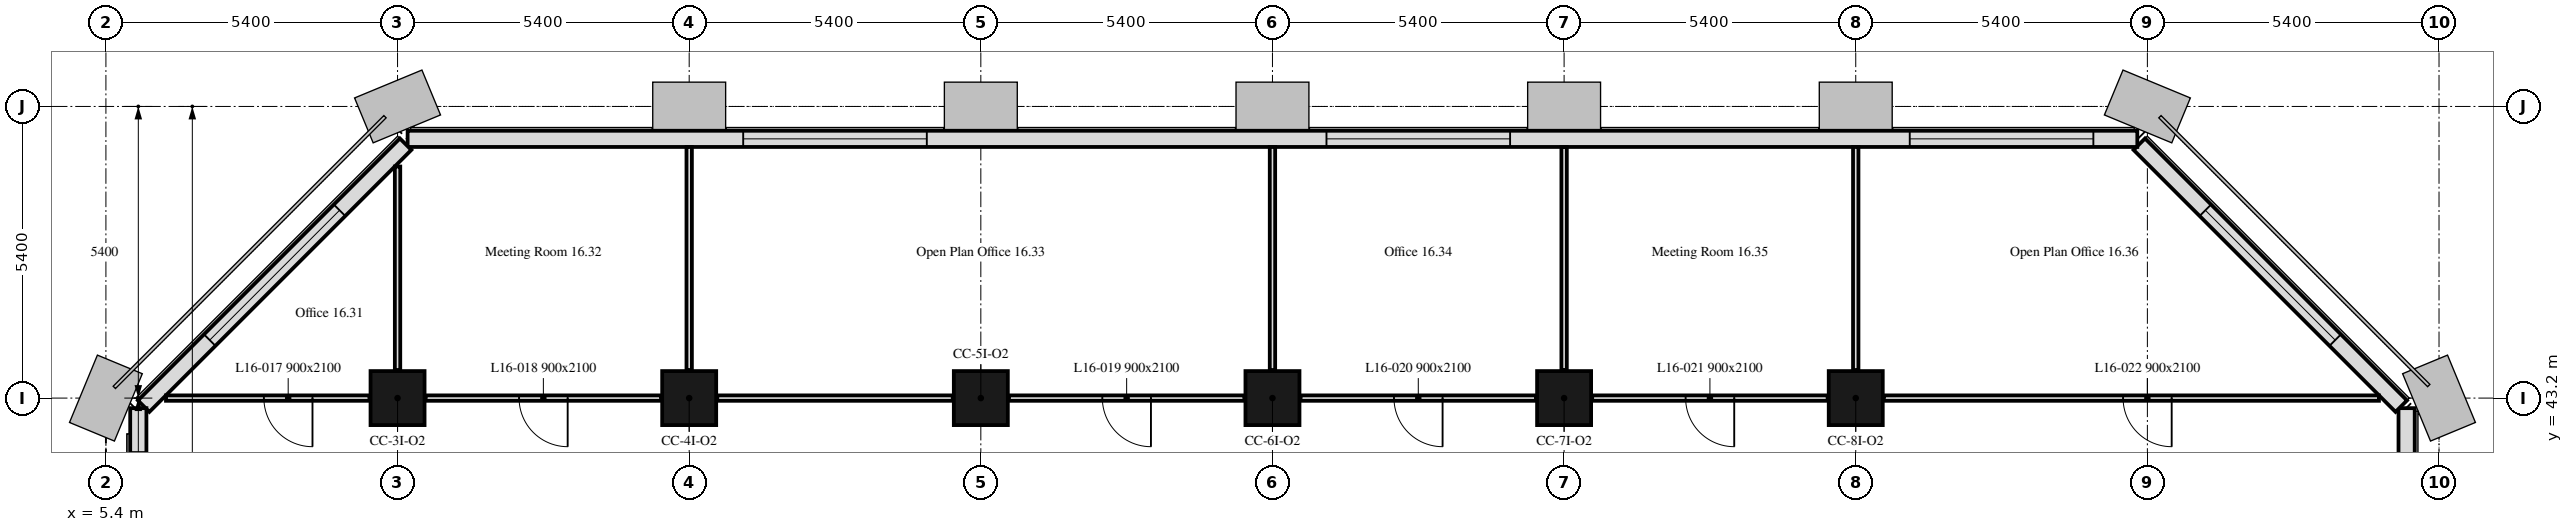
"""IFC4 building model, lengths in metres.
Left out: names, types, materials, properties, quantities, classifications, styles, units other than length and angle.
Written with IfcOpenShell. Run it as: python <this file> out.ifc"""

import sys

from ifc_helpers import new_model, si_unit, direction, frame, frame_2d, origin, origin_2d, place, context, subcontext, project, spatial, rectangle, extrude, element, fill, save


model = new_model("IFC4")
c1 = context("Model", 3, precision=1e-05, world=origin(), true_north=direction((0.0, 1.0)))
c2 = subcontext(c1, "Body", "Model", "MODEL_VIEW")
j1 = project(units=[si_unit("LENGTHUNIT", "METRE"), si_unit("PLANEANGLEUNIT", "RADIAN")], contexts=[c1])
p1 = place(None, origin())
s1 = spatial("IfcSite", under=j1, at=p1, CompositionType="ELEMENT")
p2 = place(p1, origin())
s2 = spatial("IfcBuilding", under=s1, at=p2, CompositionType="ELEMENT")
p3 = place(p2, frame((0.0, 0.0, 72.6)))
s3 = spatial("IfcBuildingStorey", under=s2, at=p3, CompositionType="ELEMENT", Elevation=72.6)
for number, where, z_axis, x_axis in (
    (1, (10.8, 43.2, 0.0), (0.0, 0.0, 1.0), (1.0, 0.0, 0.0)),
    (2, (16.2, 43.2, 0.0), (0.0, 0.0, 1.0), (1.0, 0.0, 0.0)),
    (3, (21.6, 43.2, 0.0), (0.0, 0.0, 1.0), (1.0, 0.0, 0.0)),
    (4, (27.0, 43.2, 0.0), (0.0, 0.0, 1.0), (1.0, 0.0, 0.0)),
    (5, (32.4, 43.2, 0.0), (0.0, 0.0, 1.0), (1.0, 0.0, 0.0)),
    (6, (37.8, 43.2, 0.0), (0.0, 0.0, 1.0), (1.0, 0.0, 0.0)),
):
    element("IfcColumn", number, at=place(p3, frame(where, z_axis=z_axis, x_axis=x_axis)), inside=s3, PredefinedType="COLUMN", context=c2, shape_type="SweptSolid", body=[
        extrude(rectangle(XDim=1.0, YDim=1.0, at=origin_2d()), origin(), (0.0, 0.0, 1.0), 3.5),
    ])
p4 = place(p3, frame((48.0, 10.986, 0.0), z_axis=(0.0, 0.0, 1.0), x_axis=(0.0, 1.0, 0.0)))
e7 = element("IfcWall", 7, at=p4, inside=s3, PredefinedType="SOLIDWALL", context=c2, shape_type="SweptSolid", body=[
    extrude(rectangle(XDim=32.027, YDim=0.3, at=frame_2d((16.014, 0.0))), origin(), (0.0, 0.0, 1.0), 3.5),
])
p5 = place(p4, frame((1.164, 0.0, 0.9)))
e8 = element("IfcOpeningElement", 8, at=p5, cuts=e7, PredefinedType="OPENING", context=c2, shape_type="SweptSolid", body=[
    extrude(rectangle(XDim=1.1, YDim=1.7, at=frame_2d((0.55, 0.85))), frame((0.0, 0.16, 0.0), z_axis=(0.0, -1.0, 0.0), x_axis=(1.0, 0.0, 0.0)), (0.0, 0.0, 1.0), 0.32),
])
p6 = place(p4, frame((2.764, 0.0, 0.9)))
e9 = element("IfcOpeningElement", 9, at=p6, cuts=e7, PredefinedType="OPENING", context=c2, shape_type="SweptSolid", body=[
    extrude(rectangle(XDim=1.1, YDim=1.7, at=frame_2d((0.55, 0.85))), frame((0.0, 0.16, 0.0), z_axis=(0.0, -1.0, 0.0), x_axis=(1.0, 0.0, 0.0)), (0.0, 0.0, 1.0), 0.32),
])
p7 = place(p4, frame((11.614, 0.0, 0.9)))
e10 = element("IfcOpeningElement", 10, at=p7, cuts=e7, PredefinedType="OPENING", context=c2, shape_type="SweptSolid", body=[
    extrude(rectangle(XDim=3.4, YDim=1.7, at=frame_2d((1.7, 0.85))), frame((0.0, 0.16, 0.0), z_axis=(0.0, -1.0, 0.0), x_axis=(1.0, 0.0, 0.0)), (0.0, 0.0, 1.0), 0.32),
])
p8 = place(p4, frame((22.764, 0.0, 0.9)))
e11 = element("IfcOpeningElement", 11, at=p8, cuts=e7, PredefinedType="OPENING", context=c2, shape_type="SweptSolid", body=[
    extrude(rectangle(XDim=1.1, YDim=1.7, at=frame_2d((0.55, 0.85))), frame((0.0, 0.16, 0.0), z_axis=(0.0, -1.0, 0.0), x_axis=(1.0, 0.0, 0.0)), (0.0, 0.0, 1.0), 0.32),
])
p9 = place(p4, frame((24.364, 0.0, 0.9)))
e12 = element("IfcOpeningElement", 12, at=p9, cuts=e7, PredefinedType="OPENING", context=c2, shape_type="SweptSolid", body=[
    extrude(rectangle(XDim=1.1, YDim=1.7, at=frame_2d((0.55, 0.85))), frame((0.0, 0.16, 0.0), z_axis=(0.0, -1.0, 0.0), x_axis=(1.0, 0.0, 0.0)), (0.0, 0.0, 1.0), 0.32),
])
p10 = place(p3, frame((47.901, 43.051, 0.0), z_axis=(0.0, 0.0, 1.0), x_axis=(-0.707106781187, 0.707106781187, 0.0)))
e13 = element("IfcWall", 13, at=p10, inside=s3, PredefinedType="SOLIDWALL", context=c2, shape_type="SweptSolid", body=[
    extrude(rectangle(XDim=6.86, YDim=0.3, at=frame_2d((3.43, 0.0))), origin(), (0.0, 0.0, 1.0), 3.5),
])
p11 = place(p10, frame((1.73, 0.0, 0.9)))
e14 = element("IfcOpeningElement", 14, at=p11, cuts=e13, PredefinedType="OPENING", context=c2, shape_type="SweptSolid", body=[
    extrude(rectangle(XDim=3.4, YDim=1.7, at=frame_2d((1.7, 0.85))), frame((0.0, 0.16, 0.0), z_axis=(0.0, -1.0, 0.0), x_axis=(1.0, 0.0, 0.0)), (0.0, 0.0, 1.0), 0.32),
])
p12 = place(p3, frame((43.014, 48.0, 0.0), z_axis=(0.0, 0.0, 1.0), x_axis=(-1.0, 0.0, 0.0)))
e15 = element("IfcWall", 15, at=p12, inside=s3, PredefinedType="SOLIDWALL", context=c2, shape_type="SweptSolid", body=[
    extrude(rectangle(XDim=32.027, YDim=0.3, at=frame_2d((16.014, 0.0))), origin(), (0.0, 0.0, 1.0), 3.5),
])
p13 = place(p12, frame((0.814, 0.0, 0.9)))
e16 = element("IfcOpeningElement", 16, at=p13, cuts=e15, PredefinedType="OPENING", context=c2, shape_type="SweptSolid", body=[
    extrude(rectangle(XDim=3.4, YDim=1.7, at=frame_2d((1.7, 0.85))), frame((0.0, 0.16, 0.0), z_axis=(0.0, -1.0, 0.0), x_axis=(1.0, 0.0, 0.0)), (0.0, 0.0, 1.0), 0.32),
])
p14 = place(p12, frame((11.614, 0.0, 0.9)))
e17 = element("IfcOpeningElement", 17, at=p14, cuts=e15, PredefinedType="OPENING", context=c2, shape_type="SweptSolid", body=[
    extrude(rectangle(XDim=3.4, YDim=1.7, at=frame_2d((1.7, 0.85))), frame((0.0, 0.16, 0.0), z_axis=(0.0, -1.0, 0.0), x_axis=(1.0, 0.0, 0.0)), (0.0, 0.0, 1.0), 0.32),
])
p15 = place(p12, frame((22.414, 0.0, 0.9)))
e18 = element("IfcOpeningElement", 18, at=p15, cuts=e15, PredefinedType="OPENING", context=c2, shape_type="SweptSolid", body=[
    extrude(rectangle(XDim=3.4, YDim=1.7, at=frame_2d((1.7, 0.85))), frame((0.0, 0.16, 0.0), z_axis=(0.0, -1.0, 0.0), x_axis=(1.0, 0.0, 0.0)), (0.0, 0.0, 1.0), 0.32),
])
p16 = place(p3, frame((10.949, 47.901, 0.0), z_axis=(0.0, 0.0, 1.0), x_axis=(-0.707106781187, -0.707106781187, 0.0)))
e19 = element("IfcWall", 19, at=p16, inside=s3, PredefinedType="SOLIDWALL", context=c2, shape_type="SweptSolid", body=[
    extrude(rectangle(XDim=6.86, YDim=0.3, at=frame_2d((3.43, 0.0))), origin(), (0.0, 0.0, 1.0), 3.5),
])
p17 = place(p16, frame((1.73, 0.0, 0.9)))
e20 = element("IfcOpeningElement", 20, at=p17, cuts=e19, PredefinedType="OPENING", context=c2, shape_type="SweptSolid", body=[
    extrude(rectangle(XDim=3.4, YDim=1.7, at=frame_2d((1.7, 0.85))), frame((0.0, 0.16, 0.0), z_axis=(0.0, -1.0, 0.0), x_axis=(1.0, 0.0, 0.0)), (0.0, 0.0, 1.0), 0.32),
])
p18 = place(p3, frame((6.0, 43.014, 0.0), z_axis=(0.0, 0.0, 1.0), x_axis=(0.0, -1.0, 0.0)))
e21 = element("IfcWall", 21, at=p18, inside=s3, PredefinedType="SOLIDWALL", context=c2, shape_type="SweptSolid", body=[
    extrude(rectangle(XDim=10.614, YDim=0.3, at=frame_2d((5.307, 0.0))), origin(), (0.0, 0.0, 1.0), 3.5),
])
p19 = place(p18, frame((0.814, 0.0, 0.9)))
e22 = element("IfcOpeningElement", 22, at=p19, cuts=e21, PredefinedType="OPENING", context=c2, shape_type="SweptSolid", body=[
    extrude(rectangle(XDim=3.4, YDim=1.7, at=frame_2d((1.7, 0.85))), frame((0.0, 0.16, 0.0), z_axis=(0.0, -1.0, 0.0), x_axis=(1.0, 0.0, 0.0)), (0.0, 0.0, 1.0), 0.32),
])
p20 = place(p3, frame((47.488, 43.2, 0.0), z_axis=(0.0, 0.0, 1.0), x_axis=(-1.0, 0.0, 0.0)))
e23 = element("IfcWall", 23, at=p20, inside=s3, PredefinedType="PARTITIONING", context=c2, shape_type="SweptSolid", body=[
    extrude(rectangle(XDim=9.168, YDim=0.1, at=frame_2d((4.584, 0.0))), origin(), (0.0, 0.0, 1.0), 3.5),
])
p21 = place(p20, frame((3.838, 0.0, 0.0)))
e24 = element("IfcOpeningElement", 24, at=p21, cuts=e23, PredefinedType="OPENING", context=c2, shape_type="SweptSolid", body=[
    extrude(rectangle(XDim=0.9, YDim=2.1, at=frame_2d((0.45, 1.05))), frame((0.0, 0.05, 0.0), z_axis=(0.0, -1.0, 0.0), x_axis=(1.0, 0.0, 0.0)), (0.0, 0.0, 1.0), 0.1),
])
p22 = place(p3, frame((37.28, 43.2, 0.0), z_axis=(0.0, 0.0, 1.0), x_axis=(-1.0, 0.0, 0.0)))
e25 = element("IfcWall", 25, at=p22, inside=s3, PredefinedType="PARTITIONING", context=c2, shape_type="SweptSolid", body=[
    extrude(rectangle(XDim=4.36, YDim=0.1, at=frame_2d((2.18, 0.0))), origin(), (0.0, 0.0, 1.0), 3.5),
])
p23 = place(p22, frame((1.73, 0.0, 0.0)))
e26 = element("IfcOpeningElement", 26, at=p23, cuts=e25, PredefinedType="OPENING", context=c2, shape_type="SweptSolid", body=[
    extrude(rectangle(XDim=0.9, YDim=2.1, at=frame_2d((0.45, 1.05))), frame((0.0, 0.05, 0.0), z_axis=(0.0, -1.0, 0.0), x_axis=(1.0, 0.0, 0.0)), (0.0, 0.0, 1.0), 0.1),
])
p24 = place(p3, frame((31.88, 43.2, 0.0), z_axis=(0.0, 0.0, 1.0), x_axis=(-1.0, 0.0, 0.0)))
e27 = element("IfcWall", 27, at=p24, inside=s3, PredefinedType="PARTITIONING", context=c2, shape_type="SweptSolid", body=[
    extrude(rectangle(XDim=4.36, YDim=0.1, at=frame_2d((2.18, 0.0))), origin(), (0.0, 0.0, 1.0), 3.5),
])
p25 = place(p24, frame((1.73, 0.0, 0.0)))
e28 = element("IfcOpeningElement", 28, at=p25, cuts=e27, PredefinedType="OPENING", context=c2, shape_type="SweptSolid", body=[
    extrude(rectangle(XDim=0.9, YDim=2.1, at=frame_2d((0.45, 1.05))), frame((0.0, 0.05, 0.0), z_axis=(0.0, -1.0, 0.0), x_axis=(1.0, 0.0, 0.0)), (0.0, 0.0, 1.0), 0.1),
])
p26 = place(p3, frame((26.48, 43.2, 0.0), z_axis=(0.0, 0.0, 1.0), x_axis=(-1.0, 0.0, 0.0)))
e29 = element("IfcWall", 29, at=p26, inside=s3, PredefinedType="PARTITIONING", context=c2, shape_type="SweptSolid", body=[
    extrude(rectangle(XDim=4.36, YDim=0.1, at=frame_2d((2.18, 0.0))), origin(), (0.0, 0.0, 1.0), 3.5),
])
p27 = place(p26, frame((1.73, 0.0, 0.0)))
e30 = element("IfcOpeningElement", 30, at=p27, cuts=e29, PredefinedType="OPENING", context=c2, shape_type="SweptSolid", body=[
    extrude(rectangle(XDim=0.9, YDim=2.1, at=frame_2d((0.45, 1.05))), frame((0.0, 0.05, 0.0), z_axis=(0.0, -1.0, 0.0), x_axis=(1.0, 0.0, 0.0)), (0.0, 0.0, 1.0), 0.1),
])
p28 = place(p3, frame((21.08, 43.2, 0.0), z_axis=(0.0, 0.0, 1.0), x_axis=(-1.0, 0.0, 0.0)))
e31 = element("IfcWall", 31, at=p28, inside=s3, PredefinedType="PARTITIONING", context=c2, shape_type="SweptSolid", body=[
    extrude(rectangle(XDim=4.36, YDim=0.1, at=frame_2d((2.18, 0.0))), origin(), (0.0, 0.0, 1.0), 3.5),
])
p29 = place(p3, frame((15.68, 43.2, 0.0), z_axis=(0.0, 0.0, 1.0), x_axis=(-1.0, 0.0, 0.0)))
e32 = element("IfcWall", 32, at=p29, inside=s3, PredefinedType="PARTITIONING", context=c2, shape_type="SweptSolid", body=[
    extrude(rectangle(XDim=4.36, YDim=0.1, at=frame_2d((2.18, 0.0))), origin(), (0.0, 0.0, 1.0), 3.5),
])
p30 = place(p29, frame((1.73, 0.0, 0.0)))
e33 = element("IfcOpeningElement", 33, at=p30, cuts=e32, PredefinedType="OPENING", context=c2, shape_type="SweptSolid", body=[
    extrude(rectangle(XDim=0.9, YDim=2.1, at=frame_2d((0.45, 1.05))), frame((0.0, 0.05, 0.0), z_axis=(0.0, -1.0, 0.0), x_axis=(1.0, 0.0, 0.0)), (0.0, 0.0, 1.0), 0.1),
])
p31 = place(p3, frame((10.28, 43.2, 0.0), z_axis=(0.0, 0.0, 1.0), x_axis=(-1.0, 0.0, 0.0)))
e34 = element("IfcWall", 34, at=p31, inside=s3, PredefinedType="PARTITIONING", context=c2, shape_type="SweptSolid", body=[
    extrude(rectangle(XDim=3.768, YDim=0.1, at=frame_2d((1.884, 0.0))), origin(), (0.0, 0.0, 1.0), 3.5),
])
p32 = place(p31, frame((1.055, 0.0, 0.0)))
e35 = element("IfcOpeningElement", 35, at=p32, cuts=e34, PredefinedType="OPENING", context=c2, shape_type="SweptSolid", body=[
    extrude(rectangle(XDim=0.9, YDim=2.1, at=frame_2d((0.45, 1.05))), frame((0.0, 0.05, 0.0), z_axis=(0.0, -1.0, 0.0), x_axis=(1.0, 0.0, 0.0)), (0.0, 0.0, 1.0), 0.1),
])
p33 = place(p3, frame((10.8, 43.72, 0.0), z_axis=(0.0, 0.0, 1.0), x_axis=(0.0, 1.0, 0.0)))
e36 = element("IfcWall", 36, at=p33, inside=s3, PredefinedType="PARTITIONING", context=c2, shape_type="SweptSolid", body=[
    extrude(rectangle(XDim=3.768, YDim=0.1, at=frame_2d((1.884, 0.0))), origin(), (0.0, 0.0, 1.0), 3.5),
])
for number, where, z_axis, x_axis in (
    (37, (16.2, 43.72, 0.0), (0.0, 0.0, 1.0), (0.0, 1.0, 0.0)),
    (38, (27.0, 43.72, 0.0), (0.0, 0.0, 1.0), (0.0, 1.0, 0.0)),
    (39, (32.4, 43.72, 0.0), (0.0, 0.0, 1.0), (0.0, 1.0, 0.0)),
    (40, (37.8, 43.72, 0.0), (0.0, 0.0, 1.0), (0.0, 1.0, 0.0)),
):
    element("IfcWall", number, at=place(p3, frame(where, z_axis=z_axis, x_axis=x_axis)), inside=s3, PredefinedType="PARTITIONING", context=c2, shape_type="SweptSolid", body=[
        extrude(rectangle(XDim=4.129, YDim=0.1, at=frame_2d((2.064, 0.0))), origin(), (0.0, 0.0, 1.0), 2.75),
    ])
p34 = place(p11, origin())
e41 = element("IfcWindow", 41, at=p34, inside=s3, PartitioningType="SINGLE_PANEL", PredefinedType="WINDOW", context=c2, shape_type="SweptSolid", body=[
    extrude(rectangle(XDim=3.4, YDim=1.7, at=frame_2d((1.7, 0.85))), frame((0.0, 0.03, 0.0), z_axis=(0.0, -1.0, 0.0), x_axis=(1.0, 0.0, 0.0)), (0.0, 0.0, 1.0), 0.06),
])
fill(e14, e41)
p35 = place(p13, origin())
e42 = element("IfcWindow", 42, at=p35, inside=s3, PartitioningType="SINGLE_PANEL", PredefinedType="WINDOW", context=c2, shape_type="SweptSolid", body=[
    extrude(rectangle(XDim=3.4, YDim=1.7, at=frame_2d((1.7, 0.85))), frame((0.0, 0.03, 0.0), z_axis=(0.0, -1.0, 0.0), x_axis=(1.0, 0.0, 0.0)), (0.0, 0.0, 1.0), 0.06),
])
fill(e16, e42)
p36 = place(p14, origin())
e43 = element("IfcWindow", 43, at=p36, inside=s3, PartitioningType="SINGLE_PANEL", PredefinedType="WINDOW", context=c2, shape_type="SweptSolid", body=[
    extrude(rectangle(XDim=3.4, YDim=1.7, at=frame_2d((1.7, 0.85))), frame((0.0, 0.03, 0.0), z_axis=(0.0, -1.0, 0.0), x_axis=(1.0, 0.0, 0.0)), (0.0, 0.0, 1.0), 0.06),
])
fill(e17, e43)
p37 = place(p15, origin())
e44 = element("IfcWindow", 44, at=p37, inside=s3, PartitioningType="SINGLE_PANEL", PredefinedType="WINDOW", context=c2, shape_type="SweptSolid", body=[
    extrude(rectangle(XDim=3.4, YDim=1.7, at=frame_2d((1.7, 0.85))), frame((0.0, 0.03, 0.0), z_axis=(0.0, -1.0, 0.0), x_axis=(1.0, 0.0, 0.0)), (0.0, 0.0, 1.0), 0.06),
])
fill(e18, e44)
p38 = place(p17, origin())
e45 = element("IfcWindow", 45, at=p38, inside=s3, PartitioningType="SINGLE_PANEL", PredefinedType="WINDOW", context=c2, shape_type="SweptSolid", body=[
    extrude(rectangle(XDim=3.4, YDim=1.7, at=frame_2d((1.7, 0.85))), frame((0.0, 0.03, 0.0), z_axis=(0.0, -1.0, 0.0), x_axis=(1.0, 0.0, 0.0)), (0.0, 0.0, 1.0), 0.06),
])
fill(e20, e45)
p39 = place(p32, origin())
e46 = element("IfcDoor", 46, at=p39, inside=s3, OperationType="SINGLE_SWING_RIGHT", PredefinedType="DOOR", context=c2, shape_type="SweptSolid", body=[
    extrude(rectangle(XDim=0.9, YDim=2.1, at=frame_2d((0.45, 1.05))), frame((0.0, 0.025, 0.0), z_axis=(0.0, -1.0, 0.0), x_axis=(1.0, 0.0, 0.0)), (0.0, 0.0, 1.0), 0.05),
])
fill(e35, e46)
p40 = place(p30, origin())
e47 = element("IfcDoor", 47, at=p40, inside=s3, OperationType="SINGLE_SWING_RIGHT", PredefinedType="DOOR", context=c2, shape_type="SweptSolid", body=[
    extrude(rectangle(XDim=0.9, YDim=2.1, at=frame_2d((0.45, 1.05))), frame((0.0, 0.025, 0.0), z_axis=(0.0, -1.0, 0.0), x_axis=(1.0, 0.0, 0.0)), (0.0, 0.0, 1.0), 0.05),
])
fill(e33, e47)
p41 = place(p27, origin())
e48 = element("IfcDoor", 48, at=p41, inside=s3, OperationType="SINGLE_SWING_RIGHT", PredefinedType="DOOR", context=c2, shape_type="SweptSolid", body=[
    extrude(rectangle(XDim=0.9, YDim=2.1, at=frame_2d((0.45, 1.05))), frame((0.0, 0.025, 0.0), z_axis=(0.0, -1.0, 0.0), x_axis=(1.0, 0.0, 0.0)), (0.0, 0.0, 1.0), 0.05),
])
fill(e30, e48)
p42 = place(p25, origin())
e49 = element("IfcDoor", 49, at=p42, inside=s3, OperationType="SINGLE_SWING_RIGHT", PredefinedType="DOOR", context=c2, shape_type="SweptSolid", body=[
    extrude(rectangle(XDim=0.9, YDim=2.1, at=frame_2d((0.45, 1.05))), frame((0.0, 0.025, 0.0), z_axis=(0.0, -1.0, 0.0), x_axis=(1.0, 0.0, 0.0)), (0.0, 0.0, 1.0), 0.05),
])
fill(e28, e49)
p43 = place(p23, origin())
e50 = element("IfcDoor", 50, at=p43, inside=s3, OperationType="SINGLE_SWING_LEFT", PredefinedType="DOOR", context=c2, shape_type="SweptSolid", body=[
    extrude(rectangle(XDim=0.9, YDim=2.1, at=frame_2d((0.45, 1.05))), frame((0.0, 0.025, 0.0), z_axis=(0.0, -1.0, 0.0), x_axis=(1.0, 0.0, 0.0)), (0.0, 0.0, 1.0), 0.05),
])
fill(e26, e50)
p44 = place(p21, origin())
e51 = element("IfcDoor", 51, at=p44, inside=s3, OperationType="SINGLE_SWING_LEFT", PredefinedType="DOOR", context=c2, shape_type="SweptSolid", body=[
    extrude(rectangle(XDim=0.9, YDim=2.1, at=frame_2d((0.45, 1.05))), frame((0.0, 0.025, 0.0), z_axis=(0.0, -1.0, 0.0), x_axis=(1.0, 0.0, 0.0)), (0.0, 0.0, 1.0), 0.05),
])
fill(e24, e51)
save(model, sys.argv[1])
